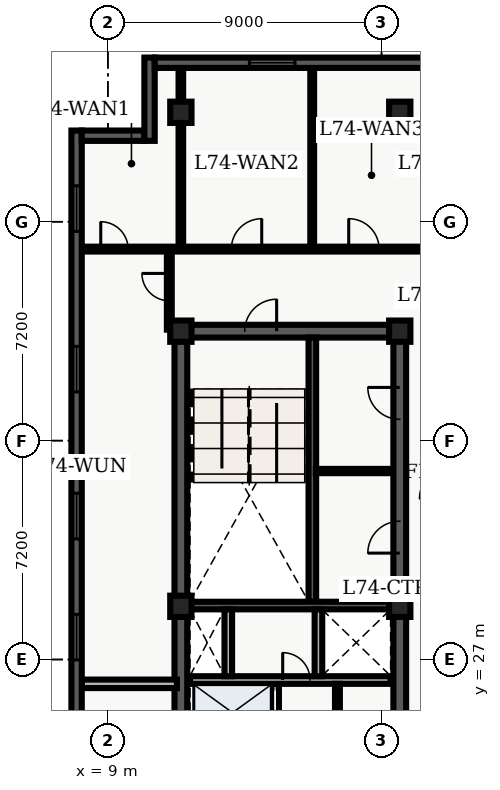
"""IFC4 building model, lengths in metres.
Left out: names, types, materials, properties, quantities, classifications, styles, units other than length and angle.
Written with IfcOpenShell. Run it as: python <this file> out.ifc"""

import sys

from ifc_helpers import new_model, entity, si_unit, converted_unit, direction, frame, origin_with_axes, origin_2d_with_axis, place, context, subcontext, project, spatial, polyline, rectangle, outline, extrude, element, fill, save


model = new_model("IFC4")
c1 = context("Model", 3, precision=1e-05, world=origin_with_axes(), true_north=direction((0.0, 1.0)))
c2 = subcontext(c1, "Body", "Model", "MODEL_VIEW")
j1 = project(units=[si_unit("LENGTHUNIT", "METRE"), converted_unit("PLANEANGLEUNIT", "DEGREE", entity("IfcPlaneAngleMeasure", 0.017), si_unit("PLANEANGLEUNIT", "RADIAN"), dimensions=[0, 0, 0, 0, 0, 0, 0])], contexts=[c1])
p1 = place(None, origin_with_axes())
s1 = spatial("IfcSite", under=j1, at=p1, CompositionType="ELEMENT")
p2 = place(p1, origin_with_axes())
s2 = spatial("IfcBuilding", under=s1, at=p2, CompositionType="ELEMENT")
p3 = place(p2, frame((0.0, 0.0, 299.7), z_axis=(0.0, 0.0, 1.0), x_axis=(1.0, 0.0, 0.0)))
s3 = spatial("IfcBuildingStorey", under=s2, at=p3, CompositionType="ELEMENT", Elevation=299.7)
p4 = place(p3, frame((11.4, 10.8, 0.0), z_axis=(0.0, 0.0, 1.0), x_axis=(0.0, 1.0, 0.0)))
e1 = element("IfcWall", 1, at=p4, inside=s3, PredefinedType="SHEAR", context=c2, shape_type="SweptSolid", body=[
    extrude(outline(polyline([(0.0, -0.21), (27.0, -0.21), (27.0, 0.21), (0.0, 0.21), (0.0, -0.21)])), origin_with_axes(), (0.0, 0.0, 1.0), 3.6),
])
p5 = place(p3, frame((11.4, 37.8, 0.0), z_axis=(0.0, 0.0, 1.0), x_axis=(1.0, 0.0, 0.0)))
e2 = element("IfcWall", 2, at=p5, inside=s3, PredefinedType="SHEAR", context=c2, shape_type="SweptSolid", body=[
    extrude(outline(polyline([(0.0, -0.21), (7.2, -0.21), (7.2, 0.21), (0.0, 0.21), (0.0, -0.21)])), origin_with_axes(), (0.0, 0.0, 1.0), 3.6),
])
p6 = place(p5, frame((2.625, 0.0, 0.0), z_axis=(0.0, 0.0, 1.0), x_axis=(1.0, 0.0, 0.0)))
e3 = element("IfcOpeningElement", 3, at=p6, cuts=e2, PredefinedType="OPENING", context=c2, shape_type="SweptSolid", body=[
    extrude(rectangle(XDim=1.05, YDim=0.44, at=origin_2d_with_axis()), origin_with_axes(), (0.0, 0.0, 1.0), 2.15),
])
p7 = place(p3, frame((18.6, 24.3, 0.0), z_axis=(0.0, 0.0, 1.0), x_axis=(0.0, 1.0, 0.0)))
e4 = element("IfcWall", 4, at=p7, inside=s3, PredefinedType="SHEAR", context=c2, shape_type="SweptSolid", body=[
    extrude(outline(polyline([(0.0, -0.21), (13.5, -0.21), (13.5, 0.21), (0.0, 0.21), (0.0, -0.21)])), origin_with_axes(), (0.0, 0.0, 1.0), 3.6),
])
p8 = place(p7, frame((6.725, 0.0, 0.0), z_axis=(0.0, 0.0, 1.0), x_axis=(1.0, 0.0, 0.0)))
e5 = element("IfcOpeningElement", 5, at=p8, cuts=e4, PredefinedType="OPENING", context=c2, shape_type="SweptSolid", body=[
    extrude(rectangle(XDim=1.05, YDim=0.44, at=origin_2d_with_axis()), origin_with_axes(), (0.0, 0.0, 1.0), 2.15),
])
p9 = place(p7, frame((11.125, 0.0, 0.0), z_axis=(0.0, 0.0, 1.0), x_axis=(1.0, 0.0, 0.0)))
e6 = element("IfcOpeningElement", 6, at=p9, cuts=e4, PredefinedType="OPENING", context=c2, shape_type="SweptSolid", body=[
    extrude(rectangle(XDim=1.05, YDim=0.44, at=origin_2d_with_axis()), origin_with_axes(), (0.0, 0.0, 1.0), 2.15),
])
p10 = place(p3, frame((15.725, 28.9, 0.0), z_axis=(0.0, 0.0, 1.0), x_axis=(0.0, 1.0, 0.0)))
e7 = element("IfcWall", 7, at=p10, inside=s3, PredefinedType="SHEAR", context=c2, shape_type="SweptSolid", body=[
    extrude(outline(polyline([(0.0, -0.125), (8.69, -0.125), (8.69, 0.125), (0.0, 0.125), (0.0, -0.125)])), origin_with_axes(), (0.0, 0.0, 1.0), 3.6),
])
p11 = place(p3, frame((11.61, 28.775, 0.0), z_axis=(0.0, 0.0, 1.0), x_axis=(1.0, 0.0, 0.0)))
e8 = element("IfcWall", 8, at=p11, inside=s3, PredefinedType="SHEAR", context=c2, shape_type="SweptSolid", body=[
    extrude(outline(polyline([(0.0, -0.125), (6.78, -0.125), (6.78, 0.125), (0.0, 0.125), (0.0, -0.125)])), origin_with_axes(), (0.0, 0.0, 1.0), 3.6),
])
p12 = place(p3, frame((14.5, 19.95, 0.0), z_axis=(0.0, 0.0, 1.0), x_axis=(0.0, 1.0, 0.0)))
e9 = element("IfcWall", 9, at=p12, inside=s3, PredefinedType="SOLIDWALL", context=c2, shape_type="SweptSolid", body=[
    extrude(outline(polyline([(0.0, -0.125), (6.25, -0.125), (6.25, 0.125), (0.0, 0.125), (0.0, -0.125)])), origin_with_axes(), (0.0, 0.0, 1.0), 2.64),
])
p13 = place(p12, frame((1.025, 0.0, 0.0), z_axis=(0.0, 0.0, 1.0), x_axis=(1.0, 0.0, 0.0)))
e10 = element("IfcOpeningElement", 10, at=p13, cuts=e9, PredefinedType="OPENING", context=c2, shape_type="SweptSolid", body=[
    extrude(rectangle(XDim=1.1, YDim=0.27, at=origin_2d_with_axis()), origin_with_axes(), (0.0, 0.0, 1.0), 2.15),
])
p14 = place(p12, frame((2.975, 0.0, 0.0), z_axis=(0.0, 0.0, 1.0), x_axis=(1.0, 0.0, 0.0)))
e11 = element("IfcOpeningElement", 11, at=p14, cuts=e9, PredefinedType="OPENING", context=c2, shape_type="SweptSolid", body=[
    extrude(rectangle(XDim=1.1, YDim=0.27, at=origin_2d_with_axis()), origin_with_axes(), (0.0, 0.0, 1.0), 2.15),
])
p15 = place(p12, frame((5.425, 0.0, 0.0), z_axis=(0.0, 0.0, 1.0), x_axis=(1.0, 0.0, 0.0)))
e12 = element("IfcOpeningElement", 12, at=p15, cuts=e9, PredefinedType="OPENING", context=c2, shape_type="SweptSolid", body=[
    extrude(rectangle(XDim=1.2, YDim=0.27, at=origin_2d_with_axis()), origin_with_axes(), (0.0, 0.0, 1.0), 2.15),
])
p16 = place(p3, frame((11.7, 26.325, 0.0), z_axis=(0.0, 0.0, 1.0), x_axis=(1.0, 0.0, 0.0)))
e13 = element("IfcWall", 13, at=p16, inside=s3, PredefinedType="SOLIDWALL", context=c2, shape_type="SweptSolid", body=[
    extrude(outline(polyline([(0.0, -0.125), (6.6, -0.125), (6.6, 0.125), (0.0, 0.125), (0.0, -0.125)])), origin_with_axes(), (0.0, 0.0, 1.0), 2.64),
])
p17 = place(p16, frame((3.5, 0.0, 0.0), z_axis=(0.0, 0.0, 1.0), x_axis=(1.0, 0.0, 0.0)))
e14 = element("IfcOpeningElement", 14, at=p17, cuts=e13, PredefinedType="OPENING", context=c2, shape_type="SweptSolid", body=[
    extrude(rectangle(XDim=0.9, YDim=0.27, at=origin_2d_with_axis()), origin_with_axes(), (0.0, 0.0, 1.0), 2.15),
])
for number, where, z_axis, x_axis in (
    (15, (12.96, 26.45, 0.0), (0.0, 0.0, 1.0), (0.0, 1.0, 0.0)),
    (16, (15.925, 26.45, 0.0), (0.0, 0.0, 1.0), (0.0, 1.0, 0.0)),
):
    element("IfcWall", number, at=place(p3, frame(where, z_axis=z_axis, x_axis=x_axis)), inside=s3, PredefinedType="SOLIDWALL", context=c2, shape_type="SweptSolid", body=[
        extrude(outline(polyline([(0.0, -0.125), (2.2, -0.125), (2.2, 0.125), (0.0, 0.125), (0.0, -0.125)])), origin_with_axes(), (0.0, 0.0, 1.0), 2.64),
    ])
for number, where, z_axis, x_axis in (
    (17, (11.4, 28.75, 0.0), (0.0, 0.0, 1.0), (1.0, 0.0, 0.0)),
    (18, (11.4, 37.8, 0.0), (0.0, 0.0, 1.0), (1.0, 0.0, 0.0)),
    (19, (11.4, 45.0, 0.0), (0.0, 0.0, 1.0), (1.0, 0.0, 0.0)),
    (20, (18.6, 28.75, 0.0), (0.0, 0.0, 1.0), (1.0, 0.0, 0.0)),
    (21, (18.6, 37.8, 0.0), (0.0, 0.0, 1.0), (1.0, 0.0, 0.0)),
    (22, (18.6, 45.0, 0.0), (0.0, 0.0, 1.0), (1.0, 0.0, 0.0)),
):
    element("IfcColumn", number, at=place(p3, frame(where, z_axis=z_axis, x_axis=x_axis)), inside=s3, PredefinedType="COLUMN", context=c2, shape_type="SweptSolid", body=[
        extrude(rectangle(XDim=0.7, YDim=0.7, at=origin_2d_with_axis()), origin_with_axes(), (0.0, 0.0, 1.0), 3.9),
    ])
p18 = place(p3, frame((16.55, 24.22, 0.0), z_axis=(0.0, 0.0, 1.0), x_axis=(0.0, 1.0, 0.0)))
e23 = element("IfcWall", 23, at=p18, inside=s3, PredefinedType="PARTITIONING", context=c2, shape_type="SweptSolid", body=[
    extrude(outline(polyline([(0.0, -0.08), (1.98, -0.08), (1.98, 0.08), (0.0, 0.08), (0.0, -0.08)])), origin_with_axes(), (0.0, 0.0, 1.0), 2.64),
])
p19 = place(p3, frame((15.84, 33.2, 0.0), z_axis=(0.0, 0.0, 1.0), x_axis=(1.0, 0.0, 0.0)))
e24 = element("IfcWall", 24, at=p19, inside=s3, PredefinedType="PARTITIONING", context=c2, shape_type="SweptSolid", body=[
    extrude(outline(polyline([(0.0, -0.07), (2.46, -0.07), (2.46, 0.07), (0.0, 0.07), (0.0, -0.07)])), origin_with_axes(), (0.0, 0.0, 1.0), 2.64),
])
p20 = place(p3, frame((8.135, 40.5, 0.0), z_axis=(0.0, 0.0, 1.0), x_axis=(1.0, 0.0, 0.0)))
e25 = element("IfcWall", 25, at=p20, inside=s3, PredefinedType="PARTITIONING", context=c2, shape_type="SweptSolid", body=[
    extrude(outline(polyline([(0.0, -0.08), (22.715, -0.08), (22.715, 0.08), (0.0, 0.08), (0.0, -0.08)])), origin_with_axes(), (0.0, 0.0, 1.0), 2.64),
])
p21 = place(p20, frame((1.08, 0.0, 0.0), z_axis=(0.0, 0.0, 1.0), x_axis=(1.0, 0.0, 0.0)))
e26 = element("IfcOpeningElement", 26, at=p21, cuts=e25, PredefinedType="OPENING", context=c2, shape_type="SweptSolid", body=[
    extrude(rectangle(XDim=0.9, YDim=0.18, at=origin_2d_with_axis()), origin_with_axes(), (0.0, 0.0, 1.0), 2.15),
])
p22 = place(p20, frame((5.425, 0.0, 0.0), z_axis=(0.0, 0.0, 1.0), x_axis=(1.0, 0.0, 0.0)))
e27 = element("IfcOpeningElement", 27, at=p22, cuts=e25, PredefinedType="OPENING", context=c2, shape_type="SweptSolid", body=[
    extrude(rectangle(XDim=1.0, YDim=0.18, at=origin_2d_with_axis()), origin_with_axes(), (0.0, 0.0, 1.0), 2.15),
])
p23 = place(p20, frame((9.286, 0.0, 0.0), z_axis=(0.0, 0.0, 1.0), x_axis=(1.0, 0.0, 0.0)))
e28 = element("IfcOpeningElement", 28, at=p23, cuts=e25, PredefinedType="OPENING", context=c2, shape_type="SweptSolid", body=[
    extrude(rectangle(XDim=1.0, YDim=0.18, at=origin_2d_with_axis()), origin_with_axes(), (0.0, 0.0, 1.0), 2.15),
])
p24 = place(p20, frame((13.621, 0.0, 0.0), z_axis=(0.0, 0.0, 1.0), x_axis=(1.0, 0.0, 0.0)))
e29 = element("IfcOpeningElement", 29, at=p24, cuts=e25, PredefinedType="OPENING", context=c2, shape_type="SweptSolid", body=[
    extrude(rectangle(XDim=1.0, YDim=0.18, at=origin_2d_with_axis()), origin_with_axes(), (0.0, 0.0, 1.0), 2.15),
])
p25 = place(p3, frame((11.02, 37.85, 0.0), z_axis=(0.0, 0.0, 1.0), x_axis=(0.0, 1.0, 0.0)))
e30 = element("IfcWall", 30, at=p25, inside=s3, PredefinedType="PARTITIONING", context=c2, shape_type="SweptSolid", body=[
    extrude(outline(polyline([(0.0, -0.08), (2.65, -0.08), (2.65, 0.08), (0.0, 0.08), (0.0, -0.08)])), origin_with_axes(), (0.0, 0.0, 1.0), 2.64),
])
p26 = place(p25, frame((1.4, 0.0, 0.0), z_axis=(0.0, 0.0, 1.0), x_axis=(1.0, 0.0, 0.0)))
e31 = element("IfcOpeningElement", 31, at=p26, cuts=e30, PredefinedType="OPENING", context=c2, shape_type="SweptSolid", body=[
    extrude(rectangle(XDim=0.9, YDim=0.18, at=origin_2d_with_axis()), origin_with_axes(), (0.0, 0.0, 1.0), 2.15),
])
p27 = place(p3, frame((8.135, 26.2, 0.0), z_axis=(0.0, 0.0, 1.0), x_axis=(1.0, 0.0, 0.0)))
e32 = element("IfcWall", 32, at=p27, inside=s3, PredefinedType="PARTITIONING", context=c2, shape_type="SweptSolid", body=[
    extrude(outline(polyline([(0.0, -0.14), (3.135, -0.14), (3.135, 0.14), (0.0, 0.14), (0.0, -0.14)])), origin_with_axes(), (0.0, 0.0, 1.0), 2.64),
])
p28 = place(p3, frame((11.4, 40.6, 0.0), z_axis=(0.0, 0.0, 1.0), x_axis=(0.0, 1.0, 0.0)))
e33 = element("IfcWall", 33, at=p28, inside=s3, PredefinedType="PARTITIONING", context=c2, shape_type="SweptSolid", body=[
    extrude(outline(polyline([(0.0, -0.075), (5.865, -0.075), (5.865, 0.075), (0.0, 0.075), (0.0, -0.075)])), origin_with_axes(), (0.0, 0.0, 1.0), 2.64),
])
p29 = place(p3, frame((15.72, 40.6, 0.0), z_axis=(0.0, 0.0, 1.0), x_axis=(0.0, 1.0, 0.0)))
e34 = element("IfcWall", 34, at=p29, inside=s3, PredefinedType="PARTITIONING", context=c2, shape_type="SweptSolid", body=[
    extrude(outline(polyline([(0.0, -0.062), (5.865, -0.062), (5.865, 0.062), (0.0, 0.062), (0.0, -0.062)])), origin_with_axes(), (0.0, 0.0, 1.0), 2.64),
])
p30 = place(p3, frame((7.97, 4.54, 0.0), z_axis=(0.0, 0.0, 1.0), x_axis=(0.0, 1.0, 0.0)))
e35 = element("IfcWall", 35, at=p30, inside=s3, PredefinedType="SOLIDWALL", context=c2, shape_type="SweptSolid", body=[
    extrude(outline(polyline([(0.0, -0.17), (39.86, -0.17), (39.86, 0.17), (0.0, 0.17), (0.0, -0.17)])), origin_with_axes(), (0.0, 0.0, 1.0), 3.6),
])
p31 = place(p30, frame((7.849, 0.0, 0.45), z_axis=(0.0, 0.0, 1.0), x_axis=(1.0, 0.0, 0.0)))
e36 = element("IfcOpeningElement", 36, at=p31, cuts=e35, PredefinedType="OPENING", context=c2, shape_type="SweptSolid", body=[
    extrude(rectangle(XDim=1.5, YDim=0.36, at=origin_2d_with_axis()), origin_with_axes(), (0.0, 0.0, 1.0), 2.1),
])
p32 = place(p30, frame((12.681, 0.0, 0.45), z_axis=(0.0, 0.0, 1.0), x_axis=(1.0, 0.0, 0.0)))
e37 = element("IfcOpeningElement", 37, at=p32, cuts=e35, PredefinedType="OPENING", context=c2, shape_type="SweptSolid", body=[
    extrude(rectangle(XDim=1.5, YDim=0.36, at=origin_2d_with_axis()), origin_with_axes(), (0.0, 0.0, 1.0), 2.1),
])
p33 = place(p30, frame((17.514, 0.0, 0.45), z_axis=(0.0, 0.0, 1.0), x_axis=(1.0, 0.0, 0.0)))
e38 = element("IfcOpeningElement", 38, at=p33, cuts=e35, PredefinedType="OPENING", context=c2, shape_type="SweptSolid", body=[
    extrude(rectangle(XDim=1.5, YDim=0.36, at=origin_2d_with_axis()), origin_with_axes(), (0.0, 0.0, 1.0), 2.1),
])
p34 = place(p30, frame((23.196, 0.0, 0.45), z_axis=(0.0, 0.0, 1.0), x_axis=(1.0, 0.0, 0.0)))
e39 = element("IfcOpeningElement", 39, at=p34, cuts=e35, PredefinedType="OPENING", context=c2, shape_type="SweptSolid", body=[
    extrude(rectangle(XDim=1.5, YDim=0.36, at=origin_2d_with_axis()), origin_with_axes(), (0.0, 0.0, 1.0), 2.1),
])
p35 = place(p30, frame((27.179, 0.0, 0.45), z_axis=(0.0, 0.0, 1.0), x_axis=(1.0, 0.0, 0.0)))
e40 = element("IfcOpeningElement", 40, at=p35, cuts=e35, PredefinedType="OPENING", context=c2, shape_type="SweptSolid", body=[
    extrude(rectangle(XDim=1.5, YDim=0.36, at=origin_2d_with_axis()), origin_with_axes(), (0.0, 0.0, 1.0), 2.1),
])
p36 = place(p30, frame((32.011, 0.0, 0.45), z_axis=(0.0, 0.0, 1.0), x_axis=(1.0, 0.0, 0.0)))
e41 = element("IfcOpeningElement", 41, at=p36, cuts=e35, PredefinedType="OPENING", context=c2, shape_type="SweptSolid", body=[
    extrude(rectangle(XDim=1.5, YDim=0.36, at=origin_2d_with_axis()), origin_with_axes(), (0.0, 0.0, 1.0), 2.1),
])
p37 = place(p30, frame((37.294, 0.0, 0.45), z_axis=(0.0, 0.0, 1.0), x_axis=(1.0, 0.0, 0.0)))
e42 = element("IfcOpeningElement", 42, at=p37, cuts=e35, PredefinedType="OPENING", context=c2, shape_type="SweptSolid", body=[
    extrude(rectangle(XDim=1.5, YDim=0.36, at=origin_2d_with_axis()), origin_with_axes(), (0.0, 0.0, 1.0), 2.1),
])
p38 = place(p3, frame((8.14, 44.23, 0.0), z_axis=(0.0, 0.0, 1.0), x_axis=(1.0, 0.0, 0.0)))
e43 = element("IfcWall", 43, at=p38, inside=s3, PredefinedType="SOLIDWALL", context=c2, shape_type="SweptSolid", body=[
    extrude(outline(polyline([(0.0, -0.17), (2.06, -0.17), (2.06, 0.17), (0.0, 0.17), (0.0, -0.17)])), origin_with_axes(), (0.0, 0.0, 1.0), 3.6),
])
p39 = place(p3, frame((10.37, 44.06, 0.0), z_axis=(0.0, 0.0, 1.0), x_axis=(0.0, 1.0, 0.0)))
e44 = element("IfcWall", 44, at=p39, inside=s3, PredefinedType="SOLIDWALL", context=c2, shape_type="SweptSolid", body=[
    extrude(outline(polyline([(0.0, -0.17), (2.74, -0.17), (2.74, 0.17), (0.0, 0.17), (0.0, -0.17)])), origin_with_axes(), (0.0, 0.0, 1.0), 3.6),
])
p40 = place(p3, frame((10.54, 46.63, 0.0), z_axis=(0.0, 0.0, 1.0), x_axis=(1.0, 0.0, 0.0)))
e45 = element("IfcWall", 45, at=p40, inside=s3, PredefinedType="SOLIDWALL", context=c2, shape_type="SweptSolid", body=[
    extrude(outline(polyline([(0.0, -0.17), (14.26, -0.17), (14.26, 0.17), (0.0, 0.17), (0.0, -0.17)])), origin_with_axes(), (0.0, 0.0, 1.0), 3.6),
])
p41 = place(p40, frame((3.865, 0.0, 0.45), z_axis=(0.0, 0.0, 1.0), x_axis=(1.0, 0.0, 0.0)))
e46 = element("IfcOpeningElement", 46, at=p41, cuts=e45, PredefinedType="OPENING", context=c2, shape_type="SweptSolid", body=[
    extrude(rectangle(XDim=1.5, YDim=0.36, at=origin_2d_with_axis()), origin_with_axes(), (0.0, 0.0, 1.0), 2.1),
])
p42 = place(p40, frame((11.245, 0.0, 0.45), z_axis=(0.0, 0.0, 1.0), x_axis=(1.0, 0.0, 0.0)))
e47 = element("IfcOpeningElement", 47, at=p42, cuts=e45, PredefinedType="OPENING", context=c2, shape_type="SweptSolid", body=[
    extrude(rectangle(XDim=1.5, YDim=0.36, at=origin_2d_with_axis()), origin_with_axes(), (0.0, 0.0, 1.0), 2.1),
])
p43 = place(p12, frame((5.425, 0.0, 0.0), z_axis=(0.0, 0.0, 1.0), x_axis=(1.0, 0.0, 0.0)))
e48 = element("IfcDoor", 48, at=p43, inside=s3, OperationType="DOUBLE_DOOR_SLIDING", PredefinedType="DOOR", context=c2, shape_type="SweptSolid", body=[
    extrude(rectangle(XDim=1.2, YDim=0.09, at=origin_2d_with_axis()), origin_with_axes(), (0.0, 0.0, 1.0), 2.15),
])
fill(e12, e48)
p44 = place(p5, frame((2.625, 0.0, 0.0), z_axis=(0.0, 0.0, 1.0), x_axis=(1.0, 0.0, 0.0)))
e49 = element("IfcDoor", 49, at=p44, inside=s3, OperationType="SINGLE_SWING_RIGHT", PredefinedType="DOOR", context=c2, shape_type="SweptSolid", body=[
    extrude(rectangle(XDim=1.05, YDim=0.09, at=origin_2d_with_axis()), origin_with_axes(), (0.0, 0.0, 1.0), 2.15),
])
fill(e3, e49)
p45 = place(p16, frame((3.5, 0.0, 0.0), z_axis=(0.0, 0.0, 1.0), x_axis=(1.0, 0.0, 0.0)))
e50 = element("IfcDoor", 50, at=p45, inside=s3, OperationType="SINGLE_SWING_LEFT", PredefinedType="DOOR", context=c2, shape_type="SweptSolid", body=[
    extrude(rectangle(XDim=0.9, YDim=0.09, at=origin_2d_with_axis()), origin_with_axes(), (0.0, 0.0, 1.0), 2.15),
])
fill(e14, e50)
p46 = place(p7, frame((6.725, 0.0, 0.0), z_axis=(0.0, 0.0, 1.0), x_axis=(1.0, 0.0, 0.0)))
e51 = element("IfcDoor", 51, at=p46, inside=s3, OperationType="SINGLE_SWING_LEFT", PredefinedType="DOOR", context=c2, shape_type="SweptSolid", body=[
    extrude(rectangle(XDim=1.05, YDim=0.09, at=origin_2d_with_axis()), origin_with_axes(), (0.0, 0.0, 1.0), 2.15),
])
fill(e5, e51)
p47 = place(p7, frame((11.125, 0.0, 0.0), z_axis=(0.0, 0.0, 1.0), x_axis=(1.0, 0.0, 0.0)))
e52 = element("IfcDoor", 52, at=p47, inside=s3, OperationType="SINGLE_SWING_RIGHT", PredefinedType="DOOR", context=c2, shape_type="SweptSolid", body=[
    extrude(rectangle(XDim=1.05, YDim=0.09, at=origin_2d_with_axis()), origin_with_axes(), (0.0, 0.0, 1.0), 2.15),
])
fill(e6, e52)
p48 = place(p25, frame((1.4, 0.0, 0.0), z_axis=(0.0, 0.0, 1.0), x_axis=(1.0, 0.0, 0.0)))
e53 = element("IfcDoor", 53, at=p48, inside=s3, OperationType="SINGLE_SWING_RIGHT", PredefinedType="DOOR", context=c2, shape_type="SweptSolid", body=[
    extrude(rectangle(XDim=0.9, YDim=0.09, at=origin_2d_with_axis()), origin_with_axes(), (0.0, 0.0, 1.0), 2.15),
])
fill(e31, e53)
p49 = place(p20, frame((1.08, 0.0, 0.0), z_axis=(0.0, 0.0, 1.0), x_axis=(1.0, 0.0, 0.0)))
e54 = element("IfcDoor", 54, at=p49, inside=s3, OperationType="SINGLE_SWING_LEFT", PredefinedType="DOOR", context=c2, shape_type="SweptSolid", body=[
    extrude(rectangle(XDim=0.9, YDim=0.09, at=origin_2d_with_axis()), origin_with_axes(), (0.0, 0.0, 1.0), 2.15),
])
fill(e26, e54)
p50 = place(p20, frame((5.425, 0.0, 0.0), z_axis=(0.0, 0.0, 1.0), x_axis=(1.0, 0.0, 0.0)))
e55 = element("IfcDoor", 55, at=p50, inside=s3, OperationType="SINGLE_SWING_RIGHT", PredefinedType="DOOR", context=c2, shape_type="SweptSolid", body=[
    extrude(rectangle(XDim=1.0, YDim=0.09, at=origin_2d_with_axis()), origin_with_axes(), (0.0, 0.0, 1.0), 2.15),
])
fill(e27, e55)
p51 = place(p20, frame((9.286, 0.0, 0.0), z_axis=(0.0, 0.0, 1.0), x_axis=(1.0, 0.0, 0.0)))
e56 = element("IfcDoor", 56, at=p51, inside=s3, OperationType="SINGLE_SWING_LEFT", PredefinedType="DOOR", context=c2, shape_type="SweptSolid", body=[
    extrude(rectangle(XDim=1.0, YDim=0.09, at=origin_2d_with_axis()), origin_with_axes(), (0.0, 0.0, 1.0), 2.15),
])
fill(e28, e56)
p52 = place(p30, frame((23.196, 0.0, 0.45), z_axis=(0.0, 0.0, 1.0), x_axis=(1.0, 0.0, 0.0)))
e57 = element("IfcWindow", 57, at=p52, inside=s3, PredefinedType="WINDOW", context=c2, shape_type="SweptSolid", body=[
    extrude(rectangle(XDim=1.5, YDim=0.09, at=origin_2d_with_axis()), origin_with_axes(), (0.0, 0.0, 1.0), 2.1),
])
fill(e39, e57)
p53 = place(p30, frame((27.179, 0.0, 0.45), z_axis=(0.0, 0.0, 1.0), x_axis=(1.0, 0.0, 0.0)))
e58 = element("IfcWindow", 58, at=p53, inside=s3, PredefinedType="WINDOW", context=c2, shape_type="SweptSolid", body=[
    extrude(rectangle(XDim=1.5, YDim=0.09, at=origin_2d_with_axis()), origin_with_axes(), (0.0, 0.0, 1.0), 2.1),
])
fill(e40, e58)
p54 = place(p30, frame((32.011, 0.0, 0.45), z_axis=(0.0, 0.0, 1.0), x_axis=(1.0, 0.0, 0.0)))
e59 = element("IfcWindow", 59, at=p54, inside=s3, PredefinedType="WINDOW", context=c2, shape_type="SweptSolid", body=[
    extrude(rectangle(XDim=1.5, YDim=0.09, at=origin_2d_with_axis()), origin_with_axes(), (0.0, 0.0, 1.0), 2.1),
])
fill(e41, e59)
p55 = place(p30, frame((37.294, 0.0, 0.45), z_axis=(0.0, 0.0, 1.0), x_axis=(1.0, 0.0, 0.0)))
e60 = element("IfcWindow", 60, at=p55, inside=s3, PredefinedType="WINDOW", context=c2, shape_type="SweptSolid", body=[
    extrude(rectangle(XDim=1.5, YDim=0.09, at=origin_2d_with_axis()), origin_with_axes(), (0.0, 0.0, 1.0), 2.1),
])
fill(e42, e60)
p56 = place(p40, frame((3.865, 0.0, 0.45), z_axis=(0.0, 0.0, 1.0), x_axis=(1.0, 0.0, 0.0)))
e61 = element("IfcWindow", 61, at=p56, inside=s3, PredefinedType="WINDOW", context=c2, shape_type="SweptSolid", body=[
    extrude(rectangle(XDim=1.5, YDim=0.09, at=origin_2d_with_axis()), origin_with_axes(), (0.0, 0.0, 1.0), 2.1),
])
fill(e46, e61)
save(model, sys.argv[1])
